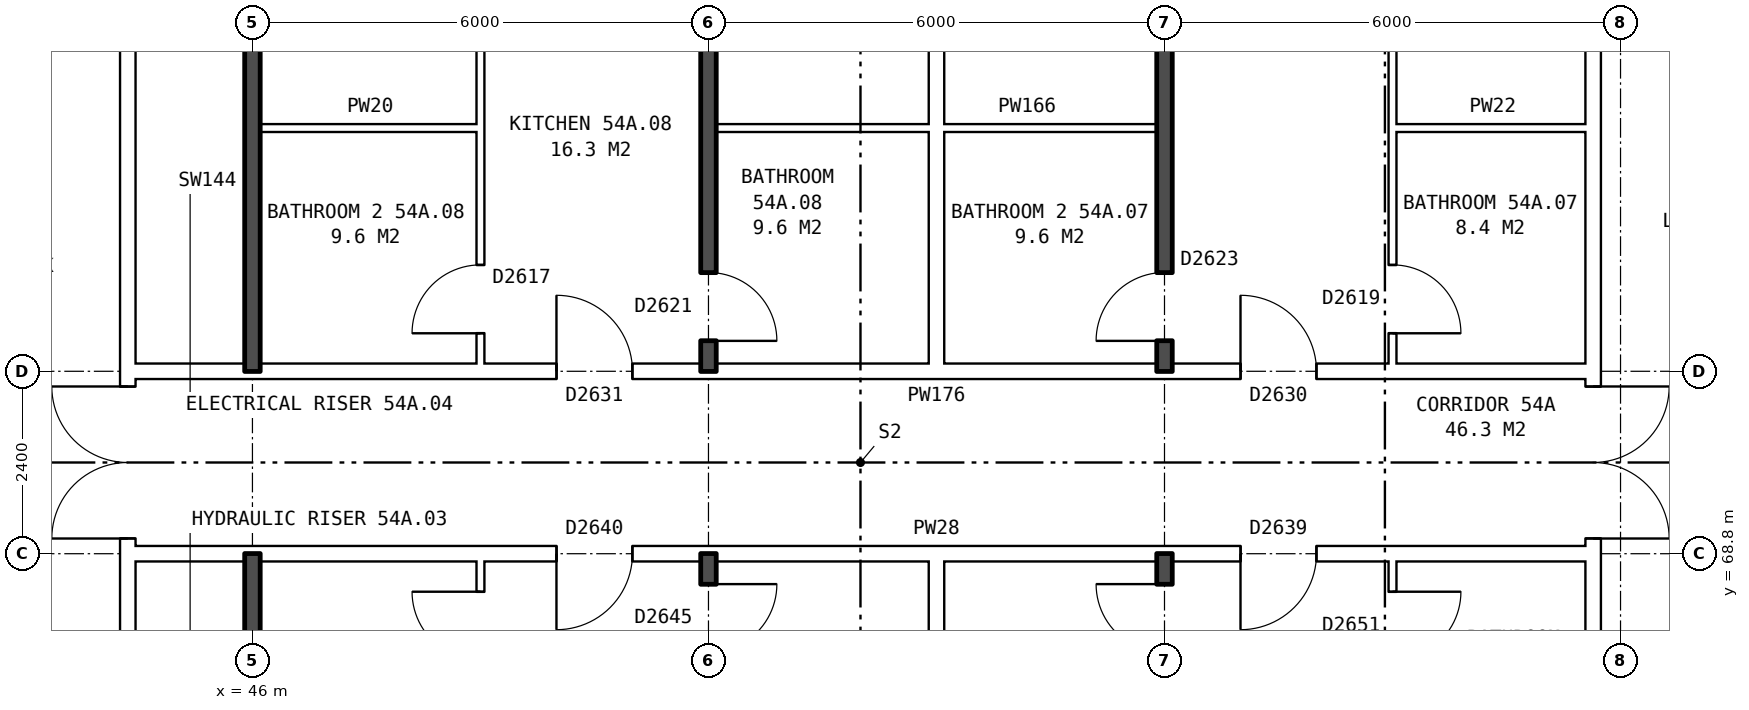
"""IFC4 building model, lengths in metres.
Left out: names, types, materials, properties, quantities, classifications, styles, units other than length and angle.
Written with IfcOpenShell. Run it as: python <this file> out.ifc"""

import sys

from ifc_helpers import new_model, si_unit, direction, frame, frame_2d, origin, place, context, subcontext, project, spatial, rectangle, extrude, element, fill, save


model = new_model("IFC4")
c1 = context("Model", 3, precision=1e-05, world=origin(), true_north=direction((0.0, 1.0)))
c2 = subcontext(c1, "Body", "Model", "MODEL_VIEW")
j1 = project(units=[si_unit("LENGTHUNIT", "METRE"), si_unit("PLANEANGLEUNIT", "RADIAN")], contexts=[c1])
p1 = place(None, origin())
s1 = spatial("IfcSite", under=j1, at=p1, CompositionType="ELEMENT")
p2 = place(p1, origin())
s2 = spatial("IfcBuilding", under=s1, at=p2, CompositionType="ELEMENT")
p3 = place(p2, frame((0.0, 0.0, 191.3)))
s3 = spatial("IfcBuildingStorey", under=s2, at=p3, CompositionType="ELEMENT", Elevation=191.3)
p4 = place(p3, frame((63.64, 63.9, 0.0), z_axis=(0.0, 0.0, 1.0), x_axis=(0.0, 1.0, 0.0)))
e1 = element("IfcWall", 1, at=p4, inside=s3, PredefinedType="PARTITIONING", context=c2, shape_type="SweptSolid", body=[
    extrude(rectangle(XDim=12.2, YDim=0.2, at=frame_2d((6.1, 0.0))), origin(), (0.0, 0.0, 1.0), 2.85),
])
p5 = place(p4, frame((5.1, 0.0, 0.0)))
e2 = element("IfcOpeningElement", 2, at=p5, cuts=e1, PredefinedType="OPENING", context=c2, shape_type="SweptSolid", body=[
    extrude(rectangle(XDim=2.0, YDim=2.1, at=frame_2d((1.0, 1.05))), frame((0.0, 0.11, 0.0), z_axis=(0.0, -1.0, 0.0), x_axis=(1.0, 0.0, 0.0)), (0.0, 0.0, 1.0), 0.22),
])
p6 = place(p3, frame((44.36, 63.9, 0.0), z_axis=(0.0, 0.0, 1.0), x_axis=(0.0, 1.0, 0.0)))
e3 = element("IfcWall", 3, at=p6, inside=s3, PredefinedType="PARTITIONING", context=c2, shape_type="SweptSolid", body=[
    extrude(rectangle(XDim=12.2, YDim=0.2, at=frame_2d((6.1, 0.0))), origin(), (0.0, 0.0, 1.0), 2.85),
])
p7 = place(p6, frame((5.1, 0.0, 0.0)))
e4 = element("IfcOpeningElement", 4, at=p7, cuts=e3, PredefinedType="OPENING", context=c2, shape_type="SweptSolid", body=[
    extrude(rectangle(XDim=2.0, YDim=2.1, at=frame_2d((1.0, 1.05))), frame((0.0, 0.11, 0.0), z_axis=(0.0, -1.0, 0.0), x_axis=(1.0, 0.0, 0.0)), (0.0, 0.0, 1.0), 0.22),
])
p8 = place(p3, frame((44.36, 68.8, 0.0), z_axis=(0.0, 0.0, 1.0), x_axis=(1.0, 0.0, 0.0)))
e5 = element("IfcWall", 5, at=p8, inside=s3, PredefinedType="PARTITIONING", context=c2, shape_type="SweptSolid", body=[
    extrude(rectangle(XDim=19.28, YDim=0.2, at=frame_2d((9.64, 0.0))), origin(), (0.0, 0.0, 1.0), 2.85),
])
p9 = place(p8, frame((14.64, 0.0, 0.0)))
e6 = element("IfcOpeningElement", 6, at=p9, cuts=e5, PredefinedType="OPENING", context=c2, shape_type="SweptSolid", body=[
    extrude(rectangle(XDim=1.0, YDim=2.1, at=frame_2d((0.5, 1.05))), frame((0.0, 0.11, 0.0), z_axis=(0.0, -1.0, 0.0), x_axis=(1.0, 0.0, 0.0)), (0.0, 0.0, 1.0), 0.22),
])
p10 = place(p8, frame((5.64, 0.0, 0.0)))
e7 = element("IfcOpeningElement", 7, at=p10, cuts=e5, PredefinedType="OPENING", context=c2, shape_type="SweptSolid", body=[
    extrude(rectangle(XDim=1.0, YDim=2.1, at=frame_2d((0.5, 1.05))), frame((0.0, 0.11, 0.0), z_axis=(0.0, -1.0, 0.0), x_axis=(1.0, 0.0, 0.0)), (0.0, 0.0, 1.0), 0.22),
])
p11 = place(p3, frame((44.36, 71.2, 0.0), z_axis=(0.0, 0.0, 1.0), x_axis=(1.0, 0.0, 0.0)))
e8 = element("IfcWall", 8, at=p11, inside=s3, PredefinedType="PARTITIONING", context=c2, shape_type="SweptSolid", body=[
    extrude(rectangle(XDim=19.28, YDim=0.2, at=frame_2d((9.64, 0.0))), origin(), (0.0, 0.0, 1.0), 2.85),
])
p12 = place(p11, frame((14.64, 0.0, 0.0)))
e9 = element("IfcOpeningElement", 9, at=p12, cuts=e8, PredefinedType="OPENING", context=c2, shape_type="SweptSolid", body=[
    extrude(rectangle(XDim=1.0, YDim=2.1, at=frame_2d((0.5, 1.05))), frame((0.0, 0.11, 0.0), z_axis=(0.0, -1.0, 0.0), x_axis=(1.0, 0.0, 0.0)), (0.0, 0.0, 1.0), 0.22),
])
p13 = place(p11, frame((5.64, 0.0, 0.0)))
e10 = element("IfcOpeningElement", 10, at=p13, cuts=e8, PredefinedType="OPENING", context=c2, shape_type="SweptSolid", body=[
    extrude(rectangle(XDim=1.0, YDim=2.1, at=frame_2d((0.5, 1.05))), frame((0.0, 0.11, 0.0), z_axis=(0.0, -1.0, 0.0), x_axis=(1.0, 0.0, 0.0)), (0.0, 0.0, 1.0), 0.22),
])
p14 = place(p3, frame((46.1, 74.4, 0.0), z_axis=(0.0, 0.0, 1.0), x_axis=(1.0, 0.0, 0.0)))
e11 = element("IfcWall", 11, at=p14, inside=s3, PredefinedType="PARTITIONING", context=c2, shape_type="SweptSolid", body=[
    extrude(rectangle(XDim=2.9, YDim=0.1, at=frame_2d((1.45, 0.0))), origin(), (0.0, 0.0, 1.0), 2.85),
])
p15 = place(p3, frame((52.1, 74.4, 0.0), z_axis=(0.0, 0.0, 1.0), x_axis=(1.0, 0.0, 0.0)))
e12 = element("IfcWall", 12, at=p15, inside=s3, PredefinedType="PARTITIONING", context=c2, shape_type="SweptSolid", body=[
    extrude(rectangle(XDim=5.8, YDim=0.1, at=frame_2d((2.9, 0.0))), origin(), (0.0, 0.0, 1.0), 2.85),
])
p16 = place(p3, frame((61.0, 74.4, 0.0), z_axis=(0.0, 0.0, 1.0), x_axis=(1.0, 0.0, 0.0)))
e13 = element("IfcWall", 13, at=p16, inside=s3, PredefinedType="PARTITIONING", context=c2, shape_type="SweptSolid", body=[
    extrude(rectangle(XDim=2.64, YDim=0.1, at=frame_2d((1.32, 0.0))), origin(), (0.0, 0.0, 1.0), 2.85),
])
for number, where, z_axis, x_axis in (
    (14, (46.0, 63.8, 0.0), (0.0, 0.0, 1.0), (0.0, 1.0, 0.0)),
    (15, (46.0, 71.2, 0.0), (0.0, 0.0, 1.0), (0.0, 1.0, 0.0)),
):
    element("IfcWall", number, at=place(p3, frame(where, z_axis=z_axis, x_axis=x_axis)), inside=s3, PredefinedType="SOLIDWALL", context=c2, shape_type="SweptSolid", body=[
        extrude(rectangle(XDim=5.0, YDim=0.2, at=frame_2d((2.5, 0.0))), origin(), (0.0, 0.0, 1.0), 2.85),
    ])
p17 = place(p3, frame((49.0, 54.36, 0.0), z_axis=(0.0, 0.0, 1.0), x_axis=(0.0, 1.0, 0.0)))
e16 = element("IfcWall", 16, at=p17, inside=s3, PredefinedType="PARTITIONING", context=c2, shape_type="SweptSolid", body=[
    extrude(rectangle(XDim=14.34, YDim=0.1, at=frame_2d((7.17, 0.0))), origin(), (0.0, 0.0, 1.0), 2.85),
])
p18 = place(p17, frame((5.5, 0.0, 0.0)))
e17 = element("IfcOpeningElement", 17, at=p18, cuts=e16, PredefinedType="OPENING", context=c2, shape_type="SweptSolid", body=[
    extrude(rectangle(XDim=0.9, YDim=2.1, at=frame_2d((0.45, 1.05))), frame((0.0, 0.06, 0.0), z_axis=(0.0, -1.0, 0.0), x_axis=(1.0, 0.0, 0.0)), (0.0, 0.0, 1.0), 0.12),
])
p19 = place(p17, frame((13.04, 0.0, 0.0)))
e18 = element("IfcOpeningElement", 18, at=p19, cuts=e16, PredefinedType="OPENING", context=c2, shape_type="SweptSolid", body=[
    extrude(rectangle(XDim=0.9, YDim=2.1, at=frame_2d((0.45, 1.05))), frame((0.0, 0.06, 0.0), z_axis=(0.0, -1.0, 0.0), x_axis=(1.0, 0.0, 0.0)), (0.0, 0.0, 1.0), 0.12),
])
p20 = place(p3, frame((49.0, 71.3, 0.0), z_axis=(0.0, 0.0, 1.0), x_axis=(0.0, 1.0, 0.0)))
e19 = element("IfcWall", 19, at=p20, inside=s3, PredefinedType="PARTITIONING", context=c2, shape_type="SweptSolid", body=[
    extrude(rectangle(XDim=14.34, YDim=0.1, at=frame_2d((7.17, 0.0))), origin(), (0.0, 0.0, 1.0), 2.85),
])
p21 = place(p20, frame((5.74, 0.0, 0.0)))
e20 = element("IfcOpeningElement", 20, at=p21, cuts=e19, PredefinedType="OPENING", context=c2, shape_type="SweptSolid", body=[
    extrude(rectangle(XDim=0.9, YDim=2.1, at=frame_2d((0.45, 1.05))), frame((0.0, 0.06, 0.0), z_axis=(0.0, -1.0, 0.0), x_axis=(1.0, 0.0, 0.0)), (0.0, 0.0, 1.0), 0.12),
])
p22 = place(p20, frame((0.4, 0.0, 0.0)))
e21 = element("IfcOpeningElement", 21, at=p22, cuts=e19, PredefinedType="OPENING", context=c2, shape_type="SweptSolid", body=[
    extrude(rectangle(XDim=0.9, YDim=2.1, at=frame_2d((0.45, 1.05))), frame((0.0, 0.06, 0.0), z_axis=(0.0, -1.0, 0.0), x_axis=(1.0, 0.0, 0.0)), (0.0, 0.0, 1.0), 0.12),
])
p23 = place(p3, frame((52.0, 54.36, 0.0), z_axis=(0.0, 0.0, 1.0), x_axis=(0.0, 1.0, 0.0)))
e22 = element("IfcWall", 22, at=p23, inside=s3, PredefinedType="SOLIDWALL", context=c2, shape_type="SweptSolid", body=[
    extrude(rectangle(XDim=14.44, YDim=0.2, at=frame_2d((7.22, 0.0))), origin(), (0.0, 0.0, 1.0), 2.85),
])
p24 = place(p23, frame((5.5, 0.0, 0.0)))
e23 = element("IfcOpeningElement", 23, at=p24, cuts=e22, PredefinedType="OPENING", context=c2, shape_type="SweptSolid", body=[
    extrude(rectangle(XDim=0.9, YDim=2.1, at=frame_2d((0.45, 1.05))), frame((0.0, 0.11, 0.0), z_axis=(0.0, -1.0, 0.0), x_axis=(1.0, 0.0, 0.0)), (0.0, 0.0, 1.0), 0.22),
])
p25 = place(p23, frame((13.14, 0.0, 0.0)))
e24 = element("IfcOpeningElement", 24, at=p25, cuts=e22, PredefinedType="OPENING", context=c2, shape_type="SweptSolid", body=[
    extrude(rectangle(XDim=0.9, YDim=2.1, at=frame_2d((0.45, 1.05))), frame((0.0, 0.11, 0.0), z_axis=(0.0, -1.0, 0.0), x_axis=(1.0, 0.0, 0.0)), (0.0, 0.0, 1.0), 0.22),
])
p26 = place(p3, frame((52.0, 71.2, 0.0), z_axis=(0.0, 0.0, 1.0), x_axis=(0.0, 1.0, 0.0)))
e25 = element("IfcWall", 25, at=p26, inside=s3, PredefinedType="SOLIDWALL", context=c2, shape_type="SweptSolid", body=[
    extrude(rectangle(XDim=14.44, YDim=0.2, at=frame_2d((7.22, 0.0))), origin(), (0.0, 0.0, 1.0), 2.85),
])
p27 = place(p26, frame((5.84, 0.0, 0.0)))
e26 = element("IfcOpeningElement", 26, at=p27, cuts=e25, PredefinedType="OPENING", context=c2, shape_type="SweptSolid", body=[
    extrude(rectangle(XDim=0.9, YDim=2.1, at=frame_2d((0.45, 1.05))), frame((0.0, 0.11, 0.0), z_axis=(0.0, -1.0, 0.0), x_axis=(1.0, 0.0, 0.0)), (0.0, 0.0, 1.0), 0.22),
])
p28 = place(p26, frame((0.4, 0.0, 0.0)))
e27 = element("IfcOpeningElement", 27, at=p28, cuts=e25, PredefinedType="OPENING", context=c2, shape_type="SweptSolid", body=[
    extrude(rectangle(XDim=0.9, YDim=2.1, at=frame_2d((0.45, 1.05))), frame((0.0, 0.11, 0.0), z_axis=(0.0, -1.0, 0.0), x_axis=(1.0, 0.0, 0.0)), (0.0, 0.0, 1.0), 0.22),
])
for number, where, z_axis, x_axis in (
    (28, (55.0, 54.36, 0.0), (0.0, 0.0, 1.0), (0.0, 1.0, 0.0)),
    (29, (55.0, 71.3, 0.0), (0.0, 0.0, 1.0), (0.0, 1.0, 0.0)),
):
    element("IfcWall", number, at=place(p3, frame(where, z_axis=z_axis, x_axis=x_axis)), inside=s3, PredefinedType="PARTITIONING", context=c2, shape_type="SweptSolid", body=[
        extrude(rectangle(XDim=14.34, YDim=0.2, at=frame_2d((7.17, 0.0))), origin(), (0.0, 0.0, 1.0), 2.85),
    ])
p29 = place(p3, frame((58.0, 54.36, 0.0), z_axis=(0.0, 0.0, 1.0), x_axis=(0.0, 1.0, 0.0)))
e30 = element("IfcWall", 30, at=p29, inside=s3, PredefinedType="SOLIDWALL", context=c2, shape_type="SweptSolid", body=[
    extrude(rectangle(XDim=14.44, YDim=0.2, at=frame_2d((7.22, 0.0))), origin(), (0.0, 0.0, 1.0), 2.85),
])
p30 = place(p29, frame((5.5, 0.0, 0.0)))
e31 = element("IfcOpeningElement", 31, at=p30, cuts=e30, PredefinedType="OPENING", context=c2, shape_type="SweptSolid", body=[
    extrude(rectangle(XDim=0.9, YDim=2.1, at=frame_2d((0.45, 1.05))), frame((0.0, 0.11, 0.0), z_axis=(0.0, -1.0, 0.0), x_axis=(1.0, 0.0, 0.0)), (0.0, 0.0, 1.0), 0.22),
])
p31 = place(p29, frame((13.14, 0.0, 0.0)))
e32 = element("IfcOpeningElement", 32, at=p31, cuts=e30, PredefinedType="OPENING", context=c2, shape_type="SweptSolid", body=[
    extrude(rectangle(XDim=0.9, YDim=2.1, at=frame_2d((0.45, 1.05))), frame((0.0, 0.11, 0.0), z_axis=(0.0, -1.0, 0.0), x_axis=(1.0, 0.0, 0.0)), (0.0, 0.0, 1.0), 0.22),
])
p32 = place(p3, frame((58.0, 71.2, 0.0), z_axis=(0.0, 0.0, 1.0), x_axis=(0.0, 1.0, 0.0)))
e33 = element("IfcWall", 33, at=p32, inside=s3, PredefinedType="SOLIDWALL", context=c2, shape_type="SweptSolid", body=[
    extrude(rectangle(XDim=14.44, YDim=0.2, at=frame_2d((7.22, 0.0))), origin(), (0.0, 0.0, 1.0), 2.85),
])
p33 = place(p32, frame((9.34, 0.0, 0.0)))
e34 = element("IfcOpeningElement", 34, at=p33, cuts=e33, PredefinedType="OPENING", context=c2, shape_type="SweptSolid", body=[
    extrude(rectangle(XDim=0.9, YDim=2.1, at=frame_2d((0.45, 1.05))), frame((0.0, 0.11, 0.0), z_axis=(0.0, -1.0, 0.0), x_axis=(1.0, 0.0, 0.0)), (0.0, 0.0, 1.0), 0.22),
])
p34 = place(p32, frame((0.4, 0.0, 0.0)))
e35 = element("IfcOpeningElement", 35, at=p34, cuts=e33, PredefinedType="OPENING", context=c2, shape_type="SweptSolid", body=[
    extrude(rectangle(XDim=0.9, YDim=2.1, at=frame_2d((0.45, 1.05))), frame((0.0, 0.11, 0.0), z_axis=(0.0, -1.0, 0.0), x_axis=(1.0, 0.0, 0.0)), (0.0, 0.0, 1.0), 0.22),
])
p35 = place(p3, frame((61.0, 54.36, 0.0), z_axis=(0.0, 0.0, 1.0), x_axis=(0.0, 1.0, 0.0)))
e36 = element("IfcWall", 36, at=p35, inside=s3, PredefinedType="PARTITIONING", context=c2, shape_type="SweptSolid", body=[
    extrude(rectangle(XDim=14.34, YDim=0.1, at=frame_2d((7.17, 0.0))), origin(), (0.0, 0.0, 1.0), 2.85),
])
p36 = place(p35, frame((5.5, 0.0, 0.0)))
e37 = element("IfcOpeningElement", 37, at=p36, cuts=e36, PredefinedType="OPENING", context=c2, shape_type="SweptSolid", body=[
    extrude(rectangle(XDim=0.9, YDim=2.1, at=frame_2d((0.45, 1.05))), frame((0.0, 0.06, 0.0), z_axis=(0.0, -1.0, 0.0), x_axis=(1.0, 0.0, 0.0)), (0.0, 0.0, 1.0), 0.12),
])
p37 = place(p35, frame((13.04, 0.0, 0.0)))
e38 = element("IfcOpeningElement", 38, at=p37, cuts=e36, PredefinedType="OPENING", context=c2, shape_type="SweptSolid", body=[
    extrude(rectangle(XDim=0.9, YDim=2.1, at=frame_2d((0.45, 1.05))), frame((0.0, 0.06, 0.0), z_axis=(0.0, -1.0, 0.0), x_axis=(1.0, 0.0, 0.0)), (0.0, 0.0, 1.0), 0.12),
])
p38 = place(p3, frame((61.0, 71.3, 0.0), z_axis=(0.0, 0.0, 1.0), x_axis=(0.0, 1.0, 0.0)))
e39 = element("IfcWall", 39, at=p38, inside=s3, PredefinedType="PARTITIONING", context=c2, shape_type="SweptSolid", body=[
    extrude(rectangle(XDim=14.34, YDim=0.1, at=frame_2d((7.17, 0.0))), origin(), (0.0, 0.0, 1.0), 2.85),
])
p39 = place(p38, frame((9.24, 0.0, 0.0)))
e40 = element("IfcOpeningElement", 40, at=p39, cuts=e39, PredefinedType="OPENING", context=c2, shape_type="SweptSolid", body=[
    extrude(rectangle(XDim=0.9, YDim=2.1, at=frame_2d((0.45, 1.05))), frame((0.0, 0.06, 0.0), z_axis=(0.0, -1.0, 0.0), x_axis=(1.0, 0.0, 0.0)), (0.0, 0.0, 1.0), 0.12),
])
p40 = place(p38, frame((0.4, 0.0, 0.0)))
e41 = element("IfcOpeningElement", 41, at=p40, cuts=e39, PredefinedType="OPENING", context=c2, shape_type="SweptSolid", body=[
    extrude(rectangle(XDim=0.9, YDim=2.1, at=frame_2d((0.45, 1.05))), frame((0.0, 0.06, 0.0), z_axis=(0.0, -1.0, 0.0), x_axis=(1.0, 0.0, 0.0)), (0.0, 0.0, 1.0), 0.12),
])
p41 = place(p5, frame((2.0, 0.0, 0.0), z_axis=(0.0, 0.0, 1.0), x_axis=(-1.0, 0.0, 0.0)))
e42 = element("IfcDoor", 42, at=p41, inside=s3, OperationType="DOUBLE_DOOR_SINGLE_SWING", PredefinedType="DOOR", context=c2, shape_type="SweptSolid", body=[
    extrude(rectangle(XDim=2.0, YDim=2.1, at=frame_2d((1.0, 1.05))), frame((0.0, 0.025, 0.0), z_axis=(0.0, -1.0, 0.0), x_axis=(1.0, 0.0, 0.0)), (0.0, 0.0, 1.0), 0.05),
])
fill(e2, e42)
p42 = place(p7, origin())
e43 = element("IfcDoor", 43, at=p42, inside=s3, OperationType="DOUBLE_DOOR_SINGLE_SWING", PredefinedType="DOOR", context=c2, shape_type="SweptSolid", body=[
    extrude(rectangle(XDim=2.0, YDim=2.1, at=frame_2d((1.0, 1.05))), frame((0.0, 0.025, 0.0), z_axis=(0.0, -1.0, 0.0), x_axis=(1.0, 0.0, 0.0)), (0.0, 0.0, 1.0), 0.05),
])
fill(e4, e43)
p43 = place(p9, frame((1.0, 0.0, 0.0), z_axis=(0.0, 0.0, 1.0), x_axis=(-1.0, 0.0, 0.0)))
e44 = element("IfcDoor", 44, at=p43, inside=s3, OperationType="SINGLE_SWING_RIGHT", PredefinedType="DOOR", context=c2, shape_type="SweptSolid", body=[
    extrude(rectangle(XDim=1.0, YDim=2.1, at=frame_2d((0.5, 1.05))), frame((0.0, 0.025, 0.0), z_axis=(0.0, -1.0, 0.0), x_axis=(1.0, 0.0, 0.0)), (0.0, 0.0, 1.0), 0.05),
])
fill(e6, e44)
p44 = place(p37, frame((0.9, 0.0, 0.0), z_axis=(0.0, 0.0, 1.0), x_axis=(-1.0, 0.0, 0.0)))
e45 = element("IfcDoor", 45, at=p44, inside=s3, OperationType="SINGLE_SWING_LEFT", PredefinedType="DOOR", context=c2, shape_type="SweptSolid", body=[
    extrude(rectangle(XDim=0.9, YDim=2.1, at=frame_2d((0.45, 1.05))), frame((0.0, 0.025, 0.0), z_axis=(0.0, -1.0, 0.0), x_axis=(1.0, 0.0, 0.0)), (0.0, 0.0, 1.0), 0.05),
])
fill(e38, e45)
p45 = place(p31, origin())
e46 = element("IfcDoor", 46, at=p45, inside=s3, OperationType="SINGLE_SWING_RIGHT", PredefinedType="DOOR", context=c2, shape_type="SweptSolid", body=[
    extrude(rectangle(XDim=0.9, YDim=2.1, at=frame_2d((0.45, 1.05))), frame((0.0, 0.025, 0.0), z_axis=(0.0, -1.0, 0.0), x_axis=(1.0, 0.0, 0.0)), (0.0, 0.0, 1.0), 0.05),
])
fill(e32, e46)
p46 = place(p10, frame((1.0, 0.0, 0.0), z_axis=(0.0, 0.0, 1.0), x_axis=(-1.0, 0.0, 0.0)))
e47 = element("IfcDoor", 47, at=p46, inside=s3, OperationType="SINGLE_SWING_RIGHT", PredefinedType="DOOR", context=c2, shape_type="SweptSolid", body=[
    extrude(rectangle(XDim=1.0, YDim=2.1, at=frame_2d((0.5, 1.05))), frame((0.0, 0.025, 0.0), z_axis=(0.0, -1.0, 0.0), x_axis=(1.0, 0.0, 0.0)), (0.0, 0.0, 1.0), 0.05),
])
fill(e7, e47)
p47 = place(p25, frame((0.9, 0.0, 0.0), z_axis=(0.0, 0.0, 1.0), x_axis=(-1.0, 0.0, 0.0)))
e48 = element("IfcDoor", 48, at=p47, inside=s3, OperationType="SINGLE_SWING_LEFT", PredefinedType="DOOR", context=c2, shape_type="SweptSolid", body=[
    extrude(rectangle(XDim=0.9, YDim=2.1, at=frame_2d((0.45, 1.05))), frame((0.0, 0.025, 0.0), z_axis=(0.0, -1.0, 0.0), x_axis=(1.0, 0.0, 0.0)), (0.0, 0.0, 1.0), 0.05),
])
fill(e24, e48)
p48 = place(p19, origin())
e49 = element("IfcDoor", 49, at=p48, inside=s3, OperationType="SINGLE_SWING_RIGHT", PredefinedType="DOOR", context=c2, shape_type="SweptSolid", body=[
    extrude(rectangle(XDim=0.9, YDim=2.1, at=frame_2d((0.45, 1.05))), frame((0.0, 0.025, 0.0), z_axis=(0.0, -1.0, 0.0), x_axis=(1.0, 0.0, 0.0)), (0.0, 0.0, 1.0), 0.05),
])
fill(e18, e49)
p49 = place(p12, origin())
e50 = element("IfcDoor", 50, at=p49, inside=s3, OperationType="SINGLE_SWING_LEFT", PredefinedType="DOOR", context=c2, shape_type="SweptSolid", body=[
    extrude(rectangle(XDim=1.0, YDim=2.1, at=frame_2d((0.5, 1.05))), frame((0.0, 0.025, 0.0), z_axis=(0.0, -1.0, 0.0), x_axis=(1.0, 0.0, 0.0)), (0.0, 0.0, 1.0), 0.05),
])
fill(e9, e50)
p50 = place(p40, frame((0.9, 0.0, 0.0), z_axis=(0.0, 0.0, 1.0), x_axis=(-1.0, 0.0, 0.0)))
e51 = element("IfcDoor", 51, at=p50, inside=s3, OperationType="SINGLE_SWING_RIGHT", PredefinedType="DOOR", context=c2, shape_type="SweptSolid", body=[
    extrude(rectangle(XDim=0.9, YDim=2.1, at=frame_2d((0.45, 1.05))), frame((0.0, 0.025, 0.0), z_axis=(0.0, -1.0, 0.0), x_axis=(1.0, 0.0, 0.0)), (0.0, 0.0, 1.0), 0.05),
])
fill(e41, e51)
p51 = place(p34, origin())
e52 = element("IfcDoor", 52, at=p51, inside=s3, OperationType="SINGLE_SWING_LEFT", PredefinedType="DOOR", context=c2, shape_type="SweptSolid", body=[
    extrude(rectangle(XDim=0.9, YDim=2.1, at=frame_2d((0.45, 1.05))), frame((0.0, 0.025, 0.0), z_axis=(0.0, -1.0, 0.0), x_axis=(1.0, 0.0, 0.0)), (0.0, 0.0, 1.0), 0.05),
])
fill(e35, e52)
p52 = place(p13, origin())
e53 = element("IfcDoor", 53, at=p52, inside=s3, OperationType="SINGLE_SWING_LEFT", PredefinedType="DOOR", context=c2, shape_type="SweptSolid", body=[
    extrude(rectangle(XDim=1.0, YDim=2.1, at=frame_2d((0.5, 1.05))), frame((0.0, 0.025, 0.0), z_axis=(0.0, -1.0, 0.0), x_axis=(1.0, 0.0, 0.0)), (0.0, 0.0, 1.0), 0.05),
])
fill(e10, e53)
p53 = place(p28, frame((0.9, 0.0, 0.0), z_axis=(0.0, 0.0, 1.0), x_axis=(-1.0, 0.0, 0.0)))
e54 = element("IfcDoor", 54, at=p53, inside=s3, OperationType="SINGLE_SWING_RIGHT", PredefinedType="DOOR", context=c2, shape_type="SweptSolid", body=[
    extrude(rectangle(XDim=0.9, YDim=2.1, at=frame_2d((0.45, 1.05))), frame((0.0, 0.025, 0.0), z_axis=(0.0, -1.0, 0.0), x_axis=(1.0, 0.0, 0.0)), (0.0, 0.0, 1.0), 0.05),
])
fill(e27, e54)
p54 = place(p22, origin())
e55 = element("IfcDoor", 55, at=p54, inside=s3, OperationType="SINGLE_SWING_LEFT", PredefinedType="DOOR", context=c2, shape_type="SweptSolid", body=[
    extrude(rectangle(XDim=0.9, YDim=2.1, at=frame_2d((0.45, 1.05))), frame((0.0, 0.025, 0.0), z_axis=(0.0, -1.0, 0.0), x_axis=(1.0, 0.0, 0.0)), (0.0, 0.0, 1.0), 0.05),
])
fill(e21, e55)
save(model, sys.argv[1])
